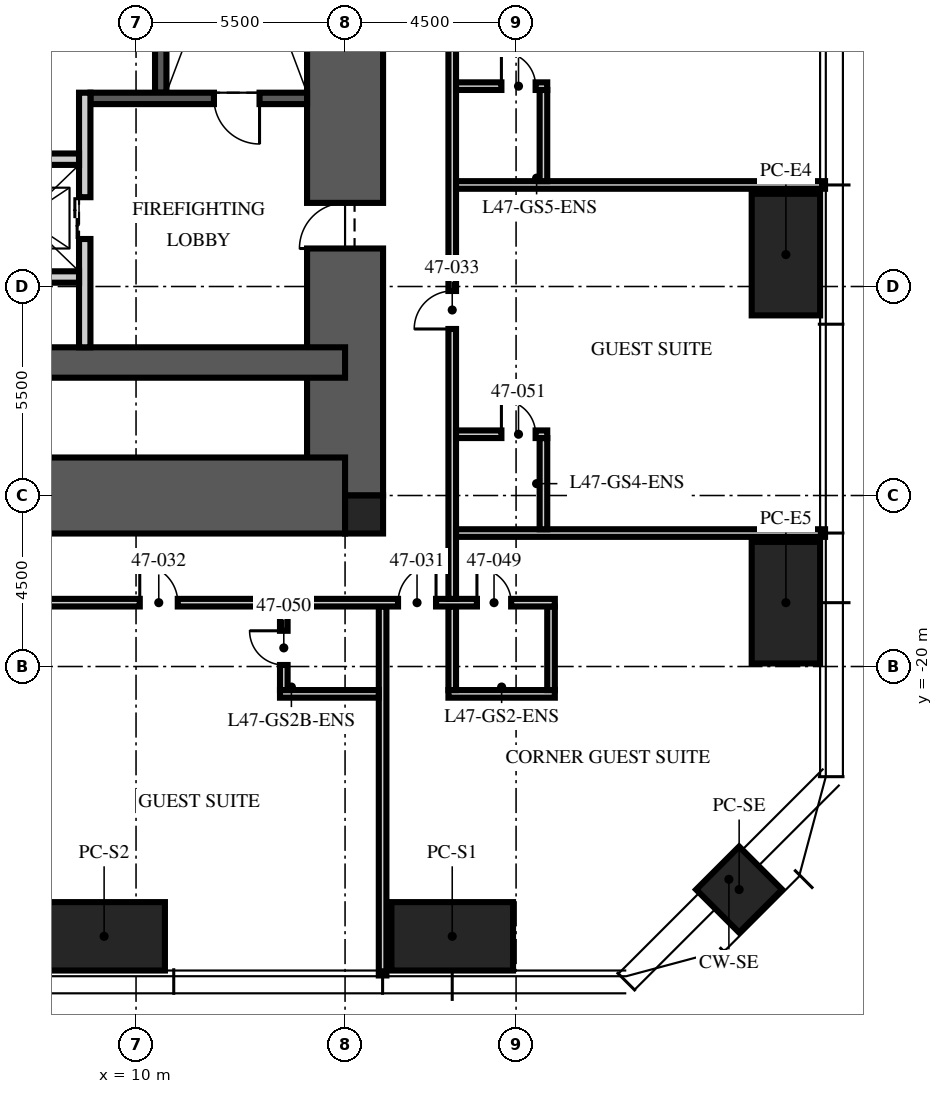
"""IFC4 building model, lengths in metres.
Left out: names, types, materials, properties, quantities, classifications, styles, units other than length and angle.
Written with IfcOpenShell. Run it as: python <this file> out.ifc"""

import sys

from ifc_helpers import new_model, si_unit, direction, frame, frame_2d, origin, origin_2d, place, context, subcontext, project, spatial, rectangle, hollow_rectangle, extrude, element, fill, save


model = new_model("IFC4")
c1 = context("Model", 3, precision=1e-05, world=origin(), true_north=direction((0.0, 1.0)))
c2 = subcontext(c1, "Body", "Model", "MODEL_VIEW")
j1 = project(units=[si_unit("LENGTHUNIT", "METRE"), si_unit("PLANEANGLEUNIT", "RADIAN")], contexts=[c1])
p1 = place(None, origin())
s1 = spatial("IfcSite", under=j1, at=p1, CompositionType="ELEMENT")
p2 = place(p1, origin())
s2 = spatial("IfcBuilding", under=s1, at=p2, CompositionType="ELEMENT")
p3 = place(p2, frame((0.0, 0.0, 186.0)))
s3 = spatial("IfcBuildingStorey", under=s2, at=p3, CompositionType="ELEMENT", Elevation=186.0)
p4 = place(p3, frame((15.5, -15.5, -0.3), z_axis=(0.0, 0.0, 1.0), x_axis=(0.0, 1.0, 0.0)))
e1 = element("IfcWall", 1, at=p4, inside=s3, PredefinedType="SHEAR", context=c2, shape_type="SweptSolid", body=[
    extrude(rectangle(XDim=31.0, YDim=2.0, at=frame_2d((15.5, 0.0))), origin(), (0.0, 0.0, 1.0), 5.95),
])
p5 = place(p4, frame((6.5, 0.0, 0.3)))
e2 = element("IfcOpeningElement", 2, at=p5, cuts=e1, PredefinedType="OPENING", context=c2, shape_type="SweptSolid", body=[
    extrude(rectangle(XDim=1.2, YDim=2.1, at=frame_2d((0.6, 1.05))), frame((0.0, 1.01, 0.0), z_axis=(0.0, -1.0, 0.0), x_axis=(1.0, 0.0, 0.0)), (0.0, 0.0, 1.0), 2.02),
])
p6 = place(p4, frame((23.0, 0.0, 0.3)))
e3 = element("IfcOpeningElement", 3, at=p6, cuts=e1, PredefinedType="OPENING", context=c2, shape_type="SweptSolid", body=[
    extrude(rectangle(XDim=1.8, YDim=2.1, at=frame_2d((0.9, 1.05))), frame((0.0, 1.01, 0.0), z_axis=(0.0, -1.0, 0.0), x_axis=(1.0, 0.0, 0.0)), (0.0, 0.0, 1.0), 2.02),
])
p7 = place(p3, frame((-15.5, -15.5, -0.3), z_axis=(0.0, 0.0, 1.0), x_axis=(1.0, 0.0, 0.0)))
e4 = element("IfcWall", 4, at=p7, inside=s3, PredefinedType="SHEAR", context=c2, shape_type="SweptSolid", body=[
    extrude(rectangle(XDim=31.0, YDim=2.0, at=frame_2d((15.5, 0.0))), origin(), (0.0, 0.0, 1.0), 5.95),
])
p8 = place(p7, frame((10.4, 0.0, 0.3)))
e5 = element("IfcOpeningElement", 5, at=p8, cuts=e4, PredefinedType="OPENING", context=c2, shape_type="SweptSolid", body=[
    extrude(rectangle(XDim=1.1, YDim=2.1, at=frame_2d((0.55, 1.05))), frame((0.0, 1.01, 0.0), z_axis=(0.0, -1.0, 0.0), x_axis=(1.0, 0.0, 0.0)), (0.0, 0.0, 1.0), 2.02),
])
p9 = place(p7, frame((13.5, 0.0, 0.3)))
e6 = element("IfcOpeningElement", 6, at=p9, cuts=e4, PredefinedType="OPENING", context=c2, shape_type="SweptSolid", body=[
    extrude(rectangle(XDim=1.1, YDim=2.1, at=frame_2d((0.55, 1.05))), frame((0.0, 1.01, 0.0), z_axis=(0.0, -1.0, 0.0), x_axis=(1.0, 0.0, 0.0)), (0.0, 0.0, 1.0), 2.02),
])
p10 = place(p7, frame((16.6, 0.0, 0.3)))
e7 = element("IfcOpeningElement", 7, at=p10, cuts=e4, PredefinedType="OPENING", context=c2, shape_type="SweptSolid", body=[
    extrude(rectangle(XDim=1.1, YDim=2.1, at=frame_2d((0.55, 1.05))), frame((0.0, 1.01, 0.0), z_axis=(0.0, -1.0, 0.0), x_axis=(1.0, 0.0, 0.0)), (0.0, 0.0, 1.0), 2.02),
])
p11 = place(p3, frame((-15.5, -12.0, -0.3), z_axis=(0.0, 0.0, 1.0), x_axis=(1.0, 0.0, 0.0)))
e8 = element("IfcWall", 8, at=p11, inside=s3, PredefinedType="SHEAR", context=c2, shape_type="SweptSolid", body=[
    extrude(rectangle(XDim=31.0, YDim=0.8, at=frame_2d((15.5, 0.0))), origin(), (0.0, 0.0, 1.0), 5.95),
])
p12 = place(p3, frame((16.0, -16.0, -0.3), z_axis=(0.0, 0.0, 1.0), x_axis=(1.0, 0.0, 0.0)))
e9 = element("IfcColumn", 9, at=p12, inside=s3, PredefinedType="COLUMN", context=c2, shape_type="SweptSolid", body=[
    extrude(rectangle(XDim=1.0, YDim=1.0, at=origin_2d()), origin(), (0.0, 0.0, 1.0), 5.95),
])
p13 = place(p3, frame((27.1, -9.16, 0.0), z_axis=(0.0, 0.0, 1.0), x_axis=(0.0, 1.0, 0.0)))
e10 = element("IfcColumn", 10, at=p13, inside=s3, PredefinedType="COLUMN", context=c2, shape_type="SweptSolid", body=[
    extrude(hollow_rectangle(XDim=3.2, YDim=1.8, WallThickness=0.2, at=origin_2d()), origin(), (0.0, 0.0, 1.0), 4.87),
])
for number, where, z_axis, x_axis in (
    (11, (27.1, -18.32, 0.0), (0.0, 0.0, 1.0), (0.0, 1.0, 0.0)),
    (12, (18.32, -27.1, 0.0), (0.0, 0.0, 1.0), (1.0, 0.0, 0.0)),
):
    element("IfcColumn", number, at=place(p3, frame(where, z_axis=z_axis, x_axis=x_axis)), inside=s3, PredefinedType="COLUMN", context=c2, shape_type="SweptSolid", body=[
        extrude(hollow_rectangle(XDim=3.2, YDim=1.8, WallThickness=0.2, at=origin_2d()), origin(), (0.0, 0.0, 1.0), 4.72),
    ])
p14 = place(p3, frame((9.16, -27.1, 0.0), z_axis=(0.0, 0.0, 1.0), x_axis=(1.0, 0.0, 0.0)))
e13 = element("IfcColumn", 13, at=p14, inside=s3, PredefinedType="COLUMN", context=c2, shape_type="SweptSolid", body=[
    extrude(hollow_rectangle(XDim=3.2, YDim=1.8, WallThickness=0.2, at=origin_2d()), origin(), (0.0, 0.0, 1.0), 4.87),
])
p15 = place(p3, frame((25.87, -25.87, 0.0), z_axis=(0.0, 0.0, 1.0), x_axis=(0.707106781187, 0.707106781187, 0.0)))
e14 = element("IfcColumn", 14, at=p15, inside=s3, PredefinedType="COLUMN", context=c2, shape_type="SweptSolid", body=[
    extrude(hollow_rectangle(XDim=1.6, YDim=1.6, WallThickness=0.1, at=origin_2d()), origin(), (0.0, 0.0, 1.0), 4.99),
])
p16 = place(p3, frame((10.65, -4.9, 0.0), z_axis=(0.0, 0.0, 1.0), x_axis=(0.0, 1.0, 0.0)))
e15 = element("IfcWall", 15, at=p16, inside=s3, PredefinedType="SOLIDWALL", context=c2, shape_type="SweptSolid", body=[
    extrude(rectangle(XDim=10.1, YDim=0.3, at=frame_2d((5.05, 0.0))), origin(), (0.0, 0.0, 1.0), 5.65),
])
p17 = place(p3, frame((14.5, -5.05, 0.0), z_axis=(0.0, 0.0, 1.0), x_axis=(-1.0, 0.0, 0.0)))
e16 = element("IfcWall", 16, at=p17, inside=s3, PredefinedType="SOLIDWALL", context=c2, shape_type="SweptSolid", body=[
    extrude(rectangle(XDim=5.7, YDim=0.3, at=frame_2d((2.85, 0.0))), origin(), (0.0, 0.0, 1.0), 5.65),
])
p18 = place(p17, frame((1.25, 0.0, 0.0)))
e17 = element("IfcOpeningElement", 17, at=p18, cuts=e16, PredefinedType="OPENING", context=c2, shape_type="SweptSolid", body=[
    extrude(rectangle(XDim=1.2, YDim=2.1, at=frame_2d((0.6, 1.05))), frame((0.0, 0.16, 0.0), z_axis=(0.0, -1.0, 0.0), x_axis=(1.0, 0.0, 0.0)), (0.0, 0.0, 1.0), 0.32),
])
p19 = place(p3, frame((8.65, -11.6, 0.0), z_axis=(0.0, 0.0, 1.0), x_axis=(0.0, 1.0, 0.0)))
e18 = element("IfcWall", 18, at=p19, inside=s3, PredefinedType="PARTITIONING", context=c2, shape_type="SweptSolid", body=[
    extrude(rectangle(XDim=6.7, YDim=0.3, at=frame_2d((3.35, 0.0))), origin(), (0.0, 0.0, 1.0), 5.65),
])
p20 = place(p19, frame((2.85, 0.0, 0.0)))
e19 = element("IfcOpeningElement", 19, at=p20, cuts=e18, PredefinedType="OPENING", context=c2, shape_type="SweptSolid", body=[
    extrude(rectangle(XDim=1.1, YDim=2.1, at=frame_2d((0.55, 1.05))), frame((0.0, 0.16, 0.0), z_axis=(0.0, -1.0, 0.0), x_axis=(1.0, 0.0, 0.0)), (0.0, 0.0, 1.0), 0.32),
])
p21 = place(p3, frame((-8.5, -6.65, 0.0), z_axis=(0.0, 0.0, 1.0), x_axis=(1.0, 0.0, 0.0)))
e20 = element("IfcWall", 20, at=p21, inside=s3, PredefinedType="PARTITIONING", context=c2, shape_type="SweptSolid", body=[
    extrude(rectangle(XDim=17.0, YDim=0.3, at=frame_2d((8.5, 0.0))), origin(), (0.0, 0.0, 1.0), 5.65),
])
p22 = place(p21, frame((7.8, 0.0, 0.0)))
e21 = element("IfcOpeningElement", 21, at=p22, cuts=e20, PredefinedType="OPENING", context=c2, shape_type="SweptSolid", body=[
    extrude(rectangle(XDim=1.3, YDim=2.4, at=frame_2d((0.65, 1.2))), frame((0.0, 0.16, 0.0), z_axis=(0.0, -1.0, 0.0), x_axis=(1.0, 0.0, 0.0)), (0.0, 0.0, 1.0), 0.32),
])
p23 = place(p21, frame((5.65, 0.0, 0.0)))
e22 = element("IfcOpeningElement", 22, at=p23, cuts=e20, PredefinedType="OPENING", context=c2, shape_type="SweptSolid", body=[
    extrude(rectangle(XDim=0.9, YDim=2.1, at=frame_2d((0.45, 1.05))), frame((0.0, 0.16, 0.0), z_axis=(0.0, -1.0, 0.0), x_axis=(1.0, 0.0, 0.0)), (0.0, 0.0, 1.0), 0.32),
])
p24 = place(p21, frame((10.4, 0.0, 0.0)))
e23 = element("IfcOpeningElement", 23, at=p24, cuts=e20, PredefinedType="OPENING", context=c2, shape_type="SweptSolid", body=[
    extrude(rectangle(XDim=0.9, YDim=2.1, at=frame_2d((0.45, 1.05))), frame((0.0, 0.16, 0.0), z_axis=(0.0, -1.0, 0.0), x_axis=(1.0, 0.0, 0.0)), (0.0, 0.0, 1.0), 0.32),
])
p25 = place(p3, frame((5.6, -9.75, 0.0), z_axis=(0.0, 0.0, 1.0), x_axis=(1.0, 0.0, 0.0)))
e24 = element("IfcWall", 24, at=p25, inside=s3, PredefinedType="PARTITIONING", context=c2, shape_type="SweptSolid", body=[
    extrude(rectangle(XDim=2.9, YDim=0.3, at=frame_2d((1.45, 0.0))), origin(), (0.0, 0.0, 1.0), 5.65),
])
p26 = place(p3, frame((16.488, -28.13, 0.0), z_axis=(0.0, 0.0, 1.0), x_axis=(0.0, 1.0, 0.0)))
e25 = element("IfcWall", 25, at=p26, inside=s3, PredefinedType="SOLIDWALL", context=c2, shape_type="SweptSolid", body=[
    extrude(rectangle(XDim=9.71, YDim=0.2, at=frame_2d((4.855, 0.0))), origin(), (0.0, 0.0, 1.0), 4.95),
])
p27 = place(p3, frame((13.788, -20.72, 0.0), z_axis=(0.0, 0.0, 1.0), x_axis=(1.0, 0.0, 0.0)))
e26 = element("IfcWall", 26, at=p27, inside=s3, PredefinedType="SOLIDWALL", context=c2, shape_type="SweptSolid", body=[
    extrude(rectangle(XDim=2.6, YDim=0.2, at=frame_2d((1.3, 0.0))), origin(), (0.0, 0.0, 1.0), 4.45),
])
p28 = place(p3, frame((18.22, -20.72, 0.0), z_axis=(0.0, 0.0, 1.0), x_axis=(1.0, 0.0, 0.0)))
e27 = element("IfcWall", 27, at=p28, inside=s3, PredefinedType="SOLIDWALL", context=c2, shape_type="SweptSolid", body=[
    extrude(rectangle(XDim=2.8, YDim=0.2, at=frame_2d((1.4, 0.0))), origin(), (0.0, 0.0, 1.0), 4.45),
])
p29 = place(p3, frame((13.888, -20.62, 0.0), z_axis=(0.0, 0.0, 1.0), x_axis=(0.0, 1.0, 0.0)))
e28 = element("IfcWall", 28, at=p29, inside=s3, PredefinedType="SOLIDWALL", context=c2, shape_type="SweptSolid", body=[
    extrude(rectangle(XDim=2.2, YDim=0.2, at=frame_2d((1.1, 0.0))), origin(), (0.0, 0.0, 1.0), 4.45),
])
p30 = place(p29, frame((0.66, 0.0, 0.0)))
e29 = element("IfcOpeningElement", 29, at=p30, cuts=e28, PredefinedType="OPENING", context=c2, shape_type="SweptSolid", body=[
    extrude(rectangle(XDim=0.9, YDim=2.1, at=frame_2d((0.45, 1.05))), frame((0.0, 0.11, 0.0), z_axis=(0.0, -1.0, 0.0), x_axis=(1.0, 0.0, 0.0)), (0.0, 0.0, 1.0), 0.22),
])
for number, where, z_axis, x_axis in (
    (30, (18.32, -20.62, 0.0), (0.0, 0.0, 1.0), (0.0, 1.0, 0.0)),
    (31, (20.92, -20.62, 0.0), (0.0, 0.0, 1.0), (0.0, 1.0, 0.0)),
):
    element("IfcWall", number, at=place(p3, frame(where, z_axis=z_axis, x_axis=x_axis)), inside=s3, PredefinedType="SOLIDWALL", context=c2, shape_type="SweptSolid", body=[
        extrude(rectangle(XDim=2.2, YDim=0.2, at=frame_2d((1.1, 0.0))), origin(), (0.0, 0.0, 1.0), 4.45),
    ])
p31 = place(p3, frame((-21.02, -18.32, 0.0), z_axis=(0.0, 0.0, 1.0), x_axis=(1.0, 0.0, 0.0)))
e32 = element("IfcWall", 32, at=p31, inside=s3, PredefinedType="SOLIDWALL", context=c2, shape_type="SweptSolid", body=[
    extrude(rectangle(XDim=42.04, YDim=0.2, at=frame_2d((21.02, 0.0))), origin(), (0.0, 0.0, 1.0), 4.45),
])
p32 = place(p31, frame((9.902, 0.0, 0.0)))
e33 = element("IfcOpeningElement", 33, at=p32, cuts=e32, PredefinedType="OPENING", context=c2, shape_type="SweptSolid", body=[
    extrude(rectangle(XDim=1.0, YDim=2.1, at=frame_2d((0.5, 1.05))), frame((0.0, 0.11, 0.0), z_axis=(0.0, -1.0, 0.0), x_axis=(1.0, 0.0, 0.0)), (0.0, 0.0, 1.0), 0.22),
])
p33 = place(p31, frame((20.13, 0.0, 0.0)))
e34 = element("IfcOpeningElement", 34, at=p33, cuts=e32, PredefinedType="OPENING", context=c2, shape_type="SweptSolid", body=[
    extrude(rectangle(XDim=1.8, YDim=2.4, at=frame_2d((0.9, 1.2))), frame((0.0, 0.11, 0.0), z_axis=(0.0, -1.0, 0.0), x_axis=(1.0, 0.0, 0.0)), (0.0, 0.0, 1.0), 0.22),
])
p34 = place(p31, frame((37.914, 0.0, 0.0)))
e35 = element("IfcOpeningElement", 35, at=p34, cuts=e32, PredefinedType="OPENING", context=c2, shape_type="SweptSolid", body=[
    extrude(rectangle(XDim=1.0, YDim=2.1, at=frame_2d((0.5, 1.05))), frame((0.0, 0.11, 0.0), z_axis=(0.0, -1.0, 0.0), x_axis=(1.0, 0.0, 0.0)), (0.0, 0.0, 1.0), 0.22),
])
p35 = place(p31, frame((31.118, 0.0, 0.0)))
e36 = element("IfcOpeningElement", 36, at=p35, cuts=e32, PredefinedType="OPENING", context=c2, shape_type="SweptSolid", body=[
    extrude(rectangle(XDim=1.0, YDim=2.1, at=frame_2d((0.5, 1.05))), frame((0.0, 0.11, 0.0), z_axis=(0.0, -1.0, 0.0), x_axis=(1.0, 0.0, 0.0)), (0.0, 0.0, 1.0), 0.22),
])
p36 = place(p31, frame((0.75, 0.0, 0.0)))
e37 = element("IfcOpeningElement", 37, at=p36, cuts=e32, PredefinedType="OPENING", context=c2, shape_type="SweptSolid", body=[
    extrude(rectangle(XDim=0.9, YDim=2.1, at=frame_2d((0.45, 1.05))), frame((0.0, 0.11, 0.0), z_axis=(0.0, -1.0, 0.0), x_axis=(1.0, 0.0, 0.0)), (0.0, 0.0, 1.0), 0.22),
])
p37 = place(p31, frame((39.99, 0.0, 0.0)))
e38 = element("IfcOpeningElement", 38, at=p37, cuts=e32, PredefinedType="OPENING", context=c2, shape_type="SweptSolid", body=[
    extrude(rectangle(XDim=0.9, YDim=2.1, at=frame_2d((0.45, 1.05))), frame((0.0, 0.11, 0.0), z_axis=(0.0, -1.0, 0.0), x_axis=(1.0, 0.0, 0.0)), (0.0, 0.0, 1.0), 0.22),
])
p38 = place(p3, frame((18.32, -18.22, 0.0), z_axis=(0.0, 0.0, 1.0), x_axis=(0.0, 1.0, 0.0)))
e39 = element("IfcWall", 39, at=p38, inside=s3, PredefinedType="SOLIDWALL", context=c2, shape_type="SweptSolid", body=[
    extrude(rectangle(XDim=36.44, YDim=0.2, at=frame_2d((18.22, 0.0))), origin(), (0.0, 0.0, 1.0), 4.45),
])
p39 = place(p38, frame((7.102, 0.0, 0.0)))
e40 = element("IfcOpeningElement", 40, at=p39, cuts=e39, PredefinedType="OPENING", context=c2, shape_type="SweptSolid", body=[
    extrude(rectangle(XDim=1.0, YDim=2.1, at=frame_2d((0.5, 1.05))), frame((0.0, 0.11, 0.0), z_axis=(0.0, -1.0, 0.0), x_axis=(1.0, 0.0, 0.0)), (0.0, 0.0, 1.0), 0.22),
])
p40 = place(p38, frame((16.262, 0.0, 0.0)))
e41 = element("IfcOpeningElement", 41, at=p40, cuts=e39, PredefinedType="OPENING", context=c2, shape_type="SweptSolid", body=[
    extrude(rectangle(XDim=1.0, YDim=2.1, at=frame_2d((0.5, 1.05))), frame((0.0, 0.11, 0.0), z_axis=(0.0, -1.0, 0.0), x_axis=(1.0, 0.0, 0.0)), (0.0, 0.0, 1.0), 0.22),
])
p41 = place(p38, frame((23.59, 0.0, 0.0)))
e42 = element("IfcOpeningElement", 42, at=p41, cuts=e39, PredefinedType="OPENING", context=c2, shape_type="SweptSolid", body=[
    extrude(rectangle(XDim=1.0, YDim=2.1, at=frame_2d((0.5, 1.05))), frame((0.0, 0.11, 0.0), z_axis=(0.0, -1.0, 0.0), x_axis=(1.0, 0.0, 0.0)), (0.0, 0.0, 1.0), 0.22),
])
p42 = place(p38, frame((28.318, 0.0, 0.0)))
e43 = element("IfcOpeningElement", 43, at=p42, cuts=e39, PredefinedType="OPENING", context=c2, shape_type="SweptSolid", body=[
    extrude(rectangle(XDim=1.0, YDim=2.1, at=frame_2d((0.5, 1.05))), frame((0.0, 0.11, 0.0), z_axis=(0.0, -1.0, 0.0), x_axis=(1.0, 0.0, 0.0)), (0.0, 0.0, 1.0), 0.22),
])
p43 = place(p38, frame((35.114, 0.0, 0.0)))
e44 = element("IfcOpeningElement", 44, at=p43, cuts=e39, PredefinedType="OPENING", context=c2, shape_type="SweptSolid", body=[
    extrude(rectangle(XDim=1.0, YDim=2.1, at=frame_2d((0.5, 1.05))), frame((0.0, 0.11, 0.0), z_axis=(0.0, -1.0, 0.0), x_axis=(1.0, 0.0, 0.0)), (0.0, 0.0, 1.0), 0.22),
])
p44 = place(p3, frame((18.42, -16.488, 0.0), z_axis=(0.0, 0.0, 1.0), x_axis=(1.0, 0.0, 0.0)))
e45 = element("IfcWall", 45, at=p44, inside=s3, PredefinedType="SOLIDWALL", context=c2, shape_type="SweptSolid", body=[
    extrude(rectangle(XDim=9.71, YDim=0.2, at=frame_2d((4.855, 0.0))), origin(), (0.0, 0.0, 1.0), 4.95),
])
p45 = place(p3, frame((20.72, -16.388, 0.0), z_axis=(0.0, 0.0, 1.0), x_axis=(0.0, 1.0, 0.0)))
e46 = element("IfcWall", 46, at=p45, inside=s3, PredefinedType="SOLIDWALL", context=c2, shape_type="SweptSolid", body=[
    extrude(rectangle(XDim=2.4, YDim=0.2, at=frame_2d((1.2, 0.0))), origin(), (0.0, 0.0, 1.0), 5.65),
])
p46 = place(p3, frame((18.42, -13.888, 0.0), z_axis=(0.0, 0.0, 1.0), x_axis=(1.0, 0.0, 0.0)))
e47 = element("IfcWall", 47, at=p46, inside=s3, PredefinedType="SOLIDWALL", context=c2, shape_type="SweptSolid", body=[
    extrude(rectangle(XDim=2.4, YDim=0.2, at=frame_2d((1.2, 0.0))), origin(), (0.0, 0.0, 1.0), 4.45),
])
p47 = place(p46, frame((1.194, 0.0, 0.0)))
e48 = element("IfcOpeningElement", 48, at=p47, cuts=e47, PredefinedType="OPENING", context=c2, shape_type="SweptSolid", body=[
    extrude(rectangle(XDim=0.9, YDim=2.1, at=frame_2d((0.45, 1.05))), frame((0.0, 0.11, 0.0), z_axis=(0.0, -1.0, 0.0), x_axis=(1.0, 0.0, 0.0)), (0.0, 0.0, 1.0), 0.22),
])
p48 = place(p3, frame((18.42, -7.328, 0.0), z_axis=(0.0, 0.0, 1.0), x_axis=(1.0, 0.0, 0.0)))
e49 = element("IfcWall", 49, at=p48, inside=s3, PredefinedType="SOLIDWALL", context=c2, shape_type="SweptSolid", body=[
    extrude(rectangle(XDim=9.71, YDim=0.2, at=frame_2d((4.855, 0.0))), origin(), (0.0, 0.0, 1.0), 4.95),
])
p49 = place(p3, frame((20.72, -7.228, 0.0), z_axis=(0.0, 0.0, 1.0), x_axis=(0.0, 1.0, 0.0)))
e50 = element("IfcWall", 50, at=p49, inside=s3, PredefinedType="SOLIDWALL", context=c2, shape_type="SweptSolid", body=[
    extrude(rectangle(XDim=2.4, YDim=0.2, at=frame_2d((1.2, 0.0))), origin(), (0.0, 0.0, 1.0), 5.65),
])
p50 = place(p3, frame((18.42, -4.728, 0.0), z_axis=(0.0, 0.0, 1.0), x_axis=(1.0, 0.0, 0.0)))
e51 = element("IfcWall", 51, at=p50, inside=s3, PredefinedType="SOLIDWALL", context=c2, shape_type="SweptSolid", body=[
    extrude(rectangle(XDim=2.4, YDim=0.2, at=frame_2d((1.2, 0.0))), origin(), (0.0, 0.0, 1.0), 4.45),
])
p51 = place(p50, frame((1.194, 0.0, 0.0)))
e52 = element("IfcOpeningElement", 52, at=p51, cuts=e51, PredefinedType="OPENING", context=c2, shape_type="SweptSolid", body=[
    extrude(rectangle(XDim=0.9, YDim=2.1, at=frame_2d((0.45, 1.05))), frame((0.0, 0.11, 0.0), z_axis=(0.0, -1.0, 0.0), x_axis=(1.0, 0.0, 0.0)), (0.0, 0.0, 1.0), 0.22),
])
p52 = place(p18, origin())
e53 = element("IfcDoor", 53, at=p52, inside=s3, OperationType="SINGLE_SWING_LEFT", PredefinedType="DOOR", context=c2, shape_type="SweptSolid", body=[
    extrude(rectangle(XDim=1.2, YDim=2.1, at=frame_2d((0.6, 1.05))), frame((0.0, 0.025, 0.0), z_axis=(0.0, -1.0, 0.0), x_axis=(1.0, 0.0, 0.0)), (0.0, 0.0, 1.0), 0.05),
])
fill(e17, e53)
p53 = place(p5, origin())
e54 = element("IfcDoor", 54, at=p53, inside=s3, OperationType="SINGLE_SWING_LEFT", PredefinedType="DOOR", context=c2, shape_type="SweptSolid", body=[
    extrude(rectangle(XDim=1.2, YDim=2.1, at=frame_2d((0.6, 1.05))), frame((0.0, 0.025, 0.0), z_axis=(0.0, -1.0, 0.0), x_axis=(1.0, 0.0, 0.0)), (0.0, 0.0, 1.0), 0.05),
])
fill(e2, e54)
p54 = place(p20, origin())
e55 = element("IfcDoor", 55, at=p54, inside=s3, OperationType="DOUBLE_DOOR_SLIDING", PredefinedType="DOOR", context=c2, shape_type="SweptSolid", body=[
    extrude(rectangle(XDim=1.1, YDim=2.1, at=frame_2d((0.55, 1.05))), frame((0.0, 0.025, 0.0), z_axis=(0.0, -1.0, 0.0), x_axis=(1.0, 0.0, 0.0)), (0.0, 0.0, 1.0), 0.05),
])
fill(e19, e55)
p55 = place(p34, origin())
e56 = element("IfcDoor", 56, at=p55, inside=s3, OperationType="SINGLE_SWING_RIGHT", PredefinedType="DOOR", context=c2, shape_type="SweptSolid", body=[
    extrude(rectangle(XDim=1.0, YDim=2.1, at=frame_2d((0.5, 1.05))), frame((0.0, 0.025, 0.0), z_axis=(0.0, -1.0, 0.0), x_axis=(1.0, 0.0, 0.0)), (0.0, 0.0, 1.0), 0.05),
])
fill(e35, e56)
p56 = place(p35, origin())
e57 = element("IfcDoor", 57, at=p56, inside=s3, OperationType="SINGLE_SWING_LEFT", PredefinedType="DOOR", context=c2, shape_type="SweptSolid", body=[
    extrude(rectangle(XDim=1.0, YDim=2.1, at=frame_2d((0.5, 1.05))), frame((0.0, 0.025, 0.0), z_axis=(0.0, -1.0, 0.0), x_axis=(1.0, 0.0, 0.0)), (0.0, 0.0, 1.0), 0.05),
])
fill(e36, e57)
p57 = place(p39, origin())
e58 = element("IfcDoor", 58, at=p57, inside=s3, OperationType="SINGLE_SWING_LEFT", PredefinedType="DOOR", context=c2, shape_type="SweptSolid", body=[
    extrude(rectangle(XDim=1.0, YDim=2.1, at=frame_2d((0.5, 1.05))), frame((0.0, 0.025, 0.0), z_axis=(0.0, -1.0, 0.0), x_axis=(1.0, 0.0, 0.0)), (0.0, 0.0, 1.0), 0.05),
])
fill(e40, e58)
p58 = place(p37, origin())
e59 = element("IfcDoor", 59, at=p58, inside=s3, OperationType="SINGLE_SWING_LEFT", PredefinedType="DOOR", context=c2, shape_type="SweptSolid", body=[
    extrude(rectangle(XDim=0.9, YDim=2.1, at=frame_2d((0.45, 1.05))), frame((0.0, 0.025, 0.0), z_axis=(0.0, -1.0, 0.0), x_axis=(1.0, 0.0, 0.0)), (0.0, 0.0, 1.0), 0.05),
])
fill(e38, e59)
p59 = place(p30, origin())
e60 = element("IfcDoor", 60, at=p59, inside=s3, OperationType="SINGLE_SWING_RIGHT", PredefinedType="DOOR", context=c2, shape_type="SweptSolid", body=[
    extrude(rectangle(XDim=0.9, YDim=2.1, at=frame_2d((0.45, 1.05))), frame((0.0, 0.025, 0.0), z_axis=(0.0, -1.0, 0.0), x_axis=(1.0, 0.0, 0.0)), (0.0, 0.0, 1.0), 0.05),
])
fill(e29, e60)
p60 = place(p47, origin())
e61 = element("IfcDoor", 61, at=p60, inside=s3, OperationType="SINGLE_SWING_LEFT", PredefinedType="DOOR", context=c2, shape_type="SweptSolid", body=[
    extrude(rectangle(XDim=0.9, YDim=2.1, at=frame_2d((0.45, 1.05))), frame((0.0, 0.025, 0.0), z_axis=(0.0, -1.0, 0.0), x_axis=(1.0, 0.0, 0.0)), (0.0, 0.0, 1.0), 0.05),
])
fill(e48, e61)
p61 = place(p51, origin())
e62 = element("IfcDoor", 62, at=p61, inside=s3, OperationType="SINGLE_SWING_LEFT", PredefinedType="DOOR", context=c2, shape_type="SweptSolid", body=[
    extrude(rectangle(XDim=0.9, YDim=2.1, at=frame_2d((0.45, 1.05))), frame((0.0, 0.025, 0.0), z_axis=(0.0, -1.0, 0.0), x_axis=(1.0, 0.0, 0.0)), (0.0, 0.0, 1.0), 0.05),
])
fill(e52, e62)
save(model, sys.argv[1])
